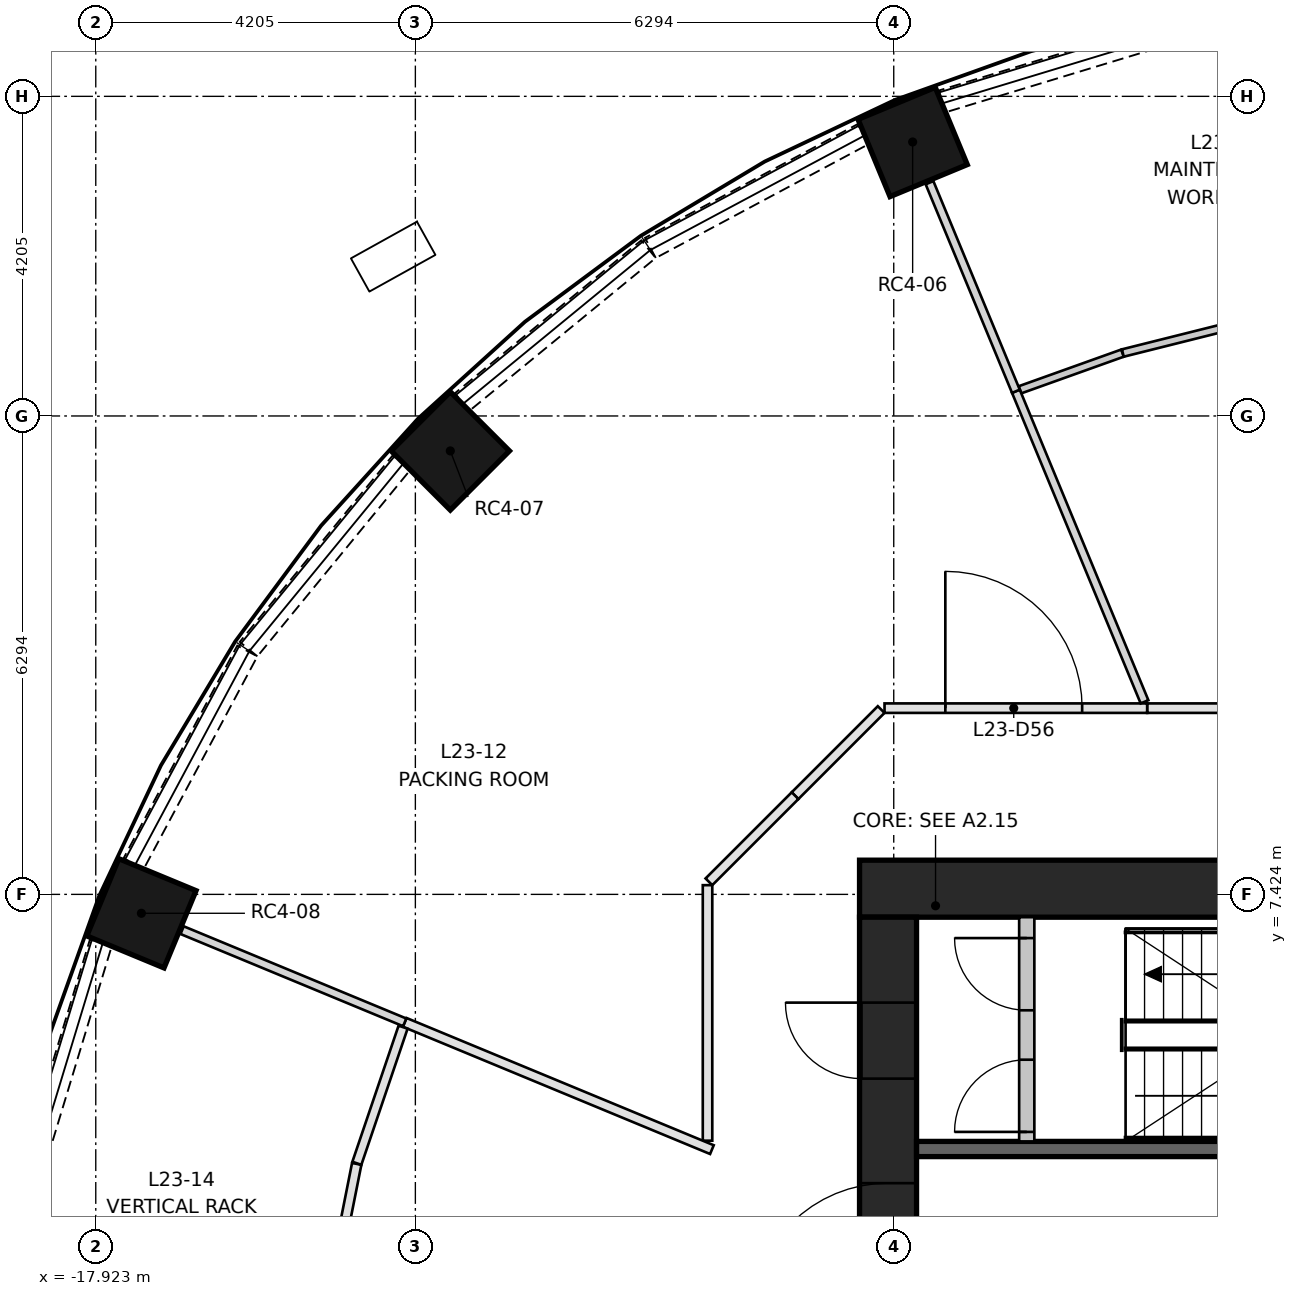
"""IFC4 building model, lengths in metres.
Left out: names, types, materials, properties, quantities, classifications, styles, units other than length and angle.
Written with IfcOpenShell. Run it as: python <this file> out.ifc"""

import sys

from ifc_helpers import new_model, si_unit, direction, frame, frame_2d, origin, origin_2d, place, context, subcontext, project, spatial, rectangle, extrude, element, fill, save


model = new_model("IFC4")
c1 = context("Model", 3, precision=1e-05, world=origin(), true_north=direction((0.0, 1.0)))
c2 = subcontext(c1, "Body", "Model", "MODEL_VIEW")
j1 = project(units=[si_unit("LENGTHUNIT", "METRE"), si_unit("PLANEANGLEUNIT", "RADIAN")], contexts=[c1])
p1 = place(None, origin())
s1 = spatial("IfcSite", under=j1, at=p1, CompositionType="ELEMENT")
p2 = place(p1, origin())
s2 = spatial("IfcBuilding", under=s1, at=p2, CompositionType="ELEMENT")
p3 = place(p2, frame((0.0, 0.0, 91.0)))
s3 = spatial("IfcBuildingStorey", under=s2, at=p3, CompositionType="ELEMENT", Elevation=91.0)
for number, where, z_axis, x_axis in (
    (1, (-7.175, 17.323, 0.0), (0.0, 0.0, 1.0), (-0.383, 0.924, 0.0)),
    (2, (-13.258, 13.258, 0.0), (0.0, 0.0, 1.0), (-0.707, 0.707, 0.0)),
    (3, (-17.323, 7.175, 0.0), (0.0, 0.0, 1.0), (-0.924, 0.383, 0.0)),
):
    element("IfcColumn", number, at=place(p3, frame(where, z_axis=z_axis, x_axis=x_axis)), inside=s3, PredefinedType="COLUMN", context=c2, shape_type="SweptSolid", body=[
        extrude(rectangle(XDim=1.1, YDim=1.1, at=origin_2d()), origin(), (0.0, 0.0, 1.0), 3.65),
    ])
p4 = place(p3, frame((-7.874, 7.499, 0.0), z_axis=(0.0, 0.0, 1.0), x_axis=(1.0, 0.0, 0.0)))
e4 = element("IfcWall", 4, at=p4, inside=s3, PredefinedType="SHEAR", context=c2, shape_type="SweptSolid", body=[
    extrude(rectangle(XDim=15.748, YDim=0.75, at=frame_2d((7.874, 0.0))), origin(), (0.0, 0.0, 1.0), 3.65),
])
p5 = place(p3, frame((-7.499, -7.124, 0.0), z_axis=(0.0, 0.0, 1.0), x_axis=(0.0, 1.0, 0.0)))
e5 = element("IfcWall", 5, at=p5, inside=s3, PredefinedType="SHEAR", context=c2, shape_type="SweptSolid", body=[
    extrude(rectangle(XDim=14.248, YDim=0.75, at=frame_2d((7.124, 0.0))), origin(), (0.0, 0.0, 1.0), 3.65),
])
p6 = place(p5, frame((6.624, 0.0, 0.0)))
e6 = element("IfcOpeningElement", 6, at=p6, cuts=e5, PredefinedType="OPENING", context=c2, shape_type="SweptSolid", body=[
    extrude(rectangle(XDim=1.0, YDim=2.1, at=frame_2d((0.5, 1.05))), frame((0.0, 0.385, 0.0), z_axis=(0.0, -1.0, 0.0), x_axis=(1.0, 0.0, 0.0)), (0.0, 0.0, 1.0), 0.77),
])
p7 = place(p5, frame((3.5, 0.0, 0.0)))
e7 = element("IfcOpeningElement", 7, at=p7, cuts=e5, PredefinedType="OPENING", context=c2, shape_type="SweptSolid", body=[
    extrude(rectangle(XDim=1.8, YDim=2.1, at=frame_2d((0.9, 1.05))), frame((0.0, 0.385, 0.0), z_axis=(0.0, -1.0, 0.0), x_axis=(1.0, 0.0, 0.0)), (0.0, 0.0, 1.0), 0.77),
])
p8 = place(p5, frame((8.948, 0.0, 0.0)))
e8 = element("IfcOpeningElement", 8, at=p8, cuts=e5, PredefinedType="OPENING", context=c2, shape_type="SweptSolid", body=[
    extrude(rectangle(XDim=1.8, YDim=2.1, at=frame_2d((0.9, 1.05))), frame((0.0, 0.385, 0.0), z_axis=(0.0, -1.0, 0.0), x_axis=(1.0, 0.0, 0.0)), (0.0, 0.0, 1.0), 0.77),
])
p9 = place(p5, frame((12.124, 0.0, 0.0)))
e9 = element("IfcOpeningElement", 9, at=p9, cuts=e5, PredefinedType="OPENING", context=c2, shape_type="SweptSolid", body=[
    extrude(rectangle(XDim=1.0, YDim=2.1, at=frame_2d((0.5, 1.05))), frame((0.0, 0.385, 0.0), z_axis=(0.0, -1.0, 0.0), x_axis=(1.0, 0.0, 0.0)), (0.0, 0.0, 1.0), 0.77),
])
p10 = place(p3, frame((-7.124, 4.074, 0.0), z_axis=(0.0, 0.0, 1.0), x_axis=(1.0, 0.0, 0.0)))
e10 = element("IfcWall", 10, at=p10, inside=s3, PredefinedType="SHEAR", context=c2, shape_type="SweptSolid", body=[
    extrude(rectangle(XDim=7.124, YDim=0.2, at=frame_2d((3.562, 0.0))), origin(), (0.0, 0.0, 1.0), 3.3),
])
p11 = place(p3, frame((-5.674, 4.174, 0.0), z_axis=(0.0, 0.0, 1.0), x_axis=(0.0, 1.0, 0.0)))
e11 = element("IfcWall", 11, at=p11, inside=s3, PredefinedType="PARTITIONING", context=c2, shape_type="SweptSolid", body=[
    extrude(rectangle(XDim=2.95, YDim=0.2, at=frame_2d((1.475, 0.0))), origin(), (0.0, 0.0, 1.0), 3.3),
])
p12 = place(p11, frame((0.125, 0.0, 0.0)))
e12 = element("IfcOpeningElement", 12, at=p12, cuts=e11, PredefinedType="OPENING", context=c2, shape_type="SweptSolid", body=[
    extrude(rectangle(XDim=0.95, YDim=2.1, at=frame_2d((0.475, 1.05))), frame((0.0, 0.11, 0.0), z_axis=(0.0, -1.0, 0.0), x_axis=(1.0, 0.0, 0.0)), (0.0, 0.0, 1.0), 0.22),
])
p13 = place(p11, frame((1.725, 0.0, 0.0)))
e13 = element("IfcOpeningElement", 13, at=p13, cuts=e11, PredefinedType="OPENING", context=c2, shape_type="SweptSolid", body=[
    extrude(rectangle(XDim=0.95, YDim=2.1, at=frame_2d((0.475, 1.05))), frame((0.0, 0.11, 0.0), z_axis=(0.0, -1.0, 0.0), x_axis=(1.0, 0.0, 0.0)), (0.0, 0.0, 1.0), 0.22),
])
p14 = place(p3, frame((-3.75, 18.778, 0.0), z_axis=(0.0, 0.0, 1.0), x_axis=(-0.956927923582, -0.290325591482, 0.0)))
e14 = element("IfcWall", 14, at=p14, inside=s3, PredefinedType="SOLIDWALL", context=c2, shape_type="SweptSolid", body=[
    extrude(rectangle(XDim=3.173, YDim=0.3, at=frame_2d((1.586, 0.0))), origin(), (0.0, 0.0, 1.0), 0.9),
])
p15 = place(p3, frame((-7.828, 17.425, 0.0), z_axis=(0.0, 0.0, 1.0), x_axis=(-0.88188808669, -0.471458802606, 0.0)))
e15 = element("IfcWall", 15, at=p15, inside=s3, PredefinedType="SOLIDWALL", context=c2, shape_type="SweptSolid", body=[
    extrude(rectangle(XDim=3.172, YDim=0.3, at=frame_2d((1.586, 0.0))), origin(), (0.0, 0.0, 1.0), 0.9),
])
for number, where, z_axis, x_axis in (
    (16, (-10.651, 15.913, 0.0), (0.0, 0.0, 1.0), (-0.773, -0.634, 0.0)),
    (17, (-13.9, 13.104, 0.0), (0.0, 0.0, 1.0), (-0.634, -0.773, 0.0)),
):
    element("IfcWall", number, at=place(p3, frame(where, z_axis=z_axis, x_axis=x_axis)), inside=s3, PredefinedType="SOLIDWALL", context=c2, shape_type="SweptSolid", body=[
        extrude(rectangle(XDim=3.173, YDim=0.3, at=frame_2d((1.586, 0.0))), origin(), (0.0, 0.0, 1.0), 0.9),
    ])
p16 = place(p3, frame((-15.929, 10.626, 0.0), z_axis=(0.0, 0.0, 1.0), x_axis=(-0.471458802606, -0.88188808669, 0.0)))
e18 = element("IfcWall", 18, at=p16, inside=s3, PredefinedType="SOLIDWALL", context=c2, shape_type="SweptSolid", body=[
    extrude(rectangle(XDim=3.172, YDim=0.3, at=frame_2d((1.586, 0.0))), origin(), (0.0, 0.0, 1.0), 0.9),
])
p17 = place(p3, frame((-17.856, 6.787, 0.0), z_axis=(0.0, 0.0, 1.0), x_axis=(-0.290325591482, -0.956927923582, 0.0)))
e19 = element("IfcWall", 19, at=p17, inside=s3, PredefinedType="SOLIDWALL", context=c2, shape_type="SweptSolid", body=[
    extrude(rectangle(XDim=3.173, YDim=0.3, at=frame_2d((1.586, 0.0))), origin(), (0.0, 0.0, 1.0), 0.9),
])
p18 = place(p3, frame((-4.09, 9.874, 0.0), z_axis=(0.0, 0.0, 1.0), x_axis=(1.0, 0.0, 0.0)))
e20 = element("IfcWall", 20, at=p18, inside=s3, PredefinedType="PARTITIONING", context=c2, shape_type="SweptSolid", body=[
    extrude(rectangle(XDim=8.18, YDim=0.125, at=frame_2d((4.09, 0.0))), origin(), (0.0, 0.0, 1.0), 3.3),
])
p19 = place(p18, frame((3.6, 0.0, 0.0)))
e21 = element("IfcOpeningElement", 21, at=p19, cuts=e20, PredefinedType="OPENING", context=c2, shape_type="SweptSolid", body=[
    extrude(rectangle(XDim=1.0, YDim=2.1, at=frame_2d((0.5, 1.05))), frame((0.0, 0.073, 0.0), z_axis=(0.0, -1.0, 0.0), x_axis=(1.0, 0.0, 0.0)), (0.0, 0.0, 1.0), 0.145),
])
p20 = place(p3, frame((-8.722, 8.722, 0.0), z_axis=(0.0, 0.0, 1.0), x_axis=(0.707030604857, 0.70718294931, 0.0)))
e22 = element("IfcWall", 22, at=p20, inside=s3, PredefinedType="PARTITIONING", context=c2, shape_type="SweptSolid", body=[
    extrude(rectangle(XDim=1.603, YDim=0.125, at=frame_2d((0.801, 0.0))), origin(), (0.0, 0.0, 1.0), 3.3),
])
p21 = place(p3, frame((-7.545, 9.874, 0.0), z_axis=(0.0, 0.0, 1.0), x_axis=(1.0, 0.0, 0.0)))
e23 = element("IfcWall", 23, at=p21, inside=s3, PredefinedType="PARTITIONING", context=c2, shape_type="SweptSolid", body=[
    extrude(rectangle(XDim=3.455, YDim=0.125, at=frame_2d((1.728, 0.0))), origin(), (0.0, 0.0, 1.0), 3.3),
])
p22 = place(p21, frame((0.8, 0.0, 0.0)))
e24 = element("IfcOpeningElement", 24, at=p22, cuts=e23, PredefinedType="OPENING", context=c2, shape_type="SweptSolid", body=[
    extrude(rectangle(XDim=1.8, YDim=2.1, at=frame_2d((0.9, 1.05))), frame((0.0, 0.073, 0.0), z_axis=(0.0, -1.0, 0.0), x_axis=(1.0, 0.0, 0.0)), (0.0, 0.0, 1.0), 0.145),
])
p23 = place(p3, frame((-9.874, 4.183, 0.0), z_axis=(0.0, 0.0, 1.0), x_axis=(0.0, 1.0, 0.0)))
e25 = element("IfcWall", 25, at=p23, inside=s3, PredefinedType="PARTITIONING", context=c2, shape_type="SweptSolid", body=[
    extrude(rectangle(XDim=3.362, YDim=0.125, at=frame_2d((1.681, 0.0))), origin(), (0.0, 0.0, 1.0), 3.3),
])
p24 = place(p3, frame((-9.856, 7.589, 0.0), z_axis=(0.0, 0.0, 1.0), x_axis=(0.70718294931, 0.707030604857, 0.0)))
e26 = element("IfcWall", 26, at=p24, inside=s3, PredefinedType="PARTITIONING", context=c2, shape_type="SweptSolid", body=[
    extrude(rectangle(XDim=1.603, YDim=0.125, at=frame_2d((0.801, 0.0))), origin(), (0.0, 0.0, 1.0), 3.3),
])
p25 = place(p3, frame((-5.763, 14.062, 0.0), z_axis=(0.0, 0.0, 1.0), x_axis=(0.941587499657, 0.33676843749, 0.0)))
e27 = element("IfcWall", 27, at=p25, inside=s3, PredefinedType="PARTITIONING", context=c2, shape_type="SweptSolid", body=[
    extrude(rectangle(XDim=1.432, YDim=0.1, at=frame_2d((0.716, 0.0))), origin(), (0.0, 0.0, 1.0), 3.3),
])
p26 = place(p3, frame((-4.41, 14.546, 0.0), z_axis=(0.0, 0.0, 1.0), x_axis=(0.970055497102, 0.242883372306, 0.0)))
e28 = element("IfcWall", 28, at=p26, inside=s3, PredefinedType="PARTITIONING", context=c2, shape_type="SweptSolid", body=[
    extrude(rectangle(XDim=1.487, YDim=0.1, at=frame_2d((0.743, 0.0))), origin(), (0.0, 0.0, 1.0), 3.3),
])
p27 = place(p3, frame((-4.125, 9.958, 0.0), z_axis=(0.0, 0.0, 1.0), x_axis=(-0.382709362011, 0.923868791674, 0.0)))
e29 = element("IfcWall", 29, at=p27, inside=s3, PredefinedType="PARTITIONING", context=c2, shape_type="SweptSolid", body=[
    extrude(rectangle(XDim=4.422, YDim=0.11, at=frame_2d((2.211, 0.0))), origin(), (0.0, 0.0, 1.0), 3.3),
])
p28 = place(p3, frame((-5.817, 14.043, 0.0), z_axis=(0.0, 0.0, 1.0), x_axis=(-0.382659139036, 0.923889594764, 0.0)))
e30 = element("IfcWall", 30, at=p28, inside=s3, PredefinedType="PARTITIONING", context=c2, shape_type="SweptSolid", body=[
    extrude(rectangle(XDim=2.97, YDim=0.11, at=frame_2d((1.485, 0.0))), origin(), (0.0, 0.0, 1.0), 3.3),
])
p29 = place(p3, frame((-9.816, 4.066, 0.0), z_axis=(0.0, 0.0, 1.0), x_axis=(-0.923865829688, 0.382716512232, 0.0)))
e31 = element("IfcWall", 31, at=p29, inside=s3, PredefinedType="PARTITIONING", context=c2, shape_type="SweptSolid", body=[
    extrude(rectangle(XDim=4.375, YDim=0.125, at=frame_2d((2.188, 0.0))), origin(), (0.0, 0.0, 1.0), 3.3),
])
p30 = place(p3, frame((-13.858, 5.74, 0.0), z_axis=(0.0, 0.0, 1.0), x_axis=(-0.923876970079, 0.382689618566, 0.0)))
e32 = element("IfcWall", 32, at=p30, inside=s3, PredefinedType="PARTITIONING", context=c2, shape_type="SweptSolid", body=[
    extrude(rectangle(XDim=3.17, YDim=0.11, at=frame_2d((1.585, 0.0))), origin(), (0.0, 0.0, 1.0), 3.3),
])
p31 = place(p3, frame((-14.871, 1.962, 0.0), z_axis=(0.0, 0.0, 1.0), x_axis=(0.195034785279, 0.980796325713, 0.0)))
e33 = element("IfcWall", 33, at=p31, inside=s3, PredefinedType="PARTITIONING", context=c2, shape_type="SweptSolid", body=[
    extrude(rectangle(XDim=1.954, YDim=0.125, at=frame_2d((0.977, 0.0))), origin(), (0.0, 0.0, 1.0), 3.3),
])
p32 = place(p3, frame((-14.488, 3.886, 0.0), z_axis=(0.0, 0.0, 1.0), x_axis=(0.321451389675, 0.946926081633, 0.0)))
e34 = element("IfcWall", 34, at=p32, inside=s3, PredefinedType="PARTITIONING", context=c2, shape_type="SweptSolid", body=[
    extrude(rectangle(XDim=1.891, YDim=0.125, at=frame_2d((0.946, 0.0))), origin(), (0.0, 0.0, 1.0), 3.3),
])
p33 = place(p12, origin())
e35 = element("IfcDoor", 35, at=p33, inside=s3, OperationType="SINGLE_SWING_LEFT", PredefinedType="DOOR", context=c2, shape_type="SweptSolid", body=[
    extrude(rectangle(XDim=0.95, YDim=2.1, at=frame_2d((0.475, 1.05))), frame((0.0, 0.025, 0.0), z_axis=(0.0, -1.0, 0.0), x_axis=(1.0, 0.0, 0.0)), (0.0, 0.0, 1.0), 0.05),
])
fill(e12, e35)
p34 = place(p13, origin())
e36 = element("IfcDoor", 36, at=p34, inside=s3, OperationType="SINGLE_SWING_RIGHT", PredefinedType="DOOR", context=c2, shape_type="SweptSolid", body=[
    extrude(rectangle(XDim=0.95, YDim=2.1, at=frame_2d((0.475, 1.05))), frame((0.0, 0.025, 0.0), z_axis=(0.0, -1.0, 0.0), x_axis=(1.0, 0.0, 0.0)), (0.0, 0.0, 1.0), 0.05),
])
fill(e13, e36)
p35 = place(p8, origin())
e37 = element("IfcDoor", 37, at=p35, inside=s3, OperationType="DOUBLE_DOOR_SINGLE_SWING", PredefinedType="DOOR", context=c2, shape_type="SweptSolid", body=[
    extrude(rectangle(XDim=1.8, YDim=2.1, at=frame_2d((0.9, 1.05))), frame((0.0, 0.025, 0.0), z_axis=(0.0, -1.0, 0.0), x_axis=(1.0, 0.0, 0.0)), (0.0, 0.0, 1.0), 0.05),
])
fill(e8, e37)
p36 = place(p9, origin())
e38 = element("IfcDoor", 38, at=p36, inside=s3, OperationType="SINGLE_SWING_RIGHT", PredefinedType="DOOR", context=c2, shape_type="SweptSolid", body=[
    extrude(rectangle(XDim=1.0, YDim=2.1, at=frame_2d((0.5, 1.05))), frame((0.0, 0.375, 0.0), z_axis=(0.0, -1.0, 0.0), x_axis=(1.0, 0.0, 0.0)), (0.0, 0.0, 1.0), 0.05),
])
fill(e9, e38)
p37 = place(p22, origin())
e39 = element("IfcDoor", 39, at=p37, inside=s3, OperationType="DOUBLE_DOOR_SINGLE_SWING", PredefinedType="DOOR", context=c2, shape_type="SweptSolid", body=[
    extrude(rectangle(XDim=1.8, YDim=2.1, at=frame_2d((0.9, 1.05))), frame((0.0, 0.025, 0.0), z_axis=(0.0, -1.0, 0.0), x_axis=(1.0, 0.0, 0.0)), (0.0, 0.0, 1.0), 0.05),
])
fill(e24, e39)
save(model, sys.argv[1])
